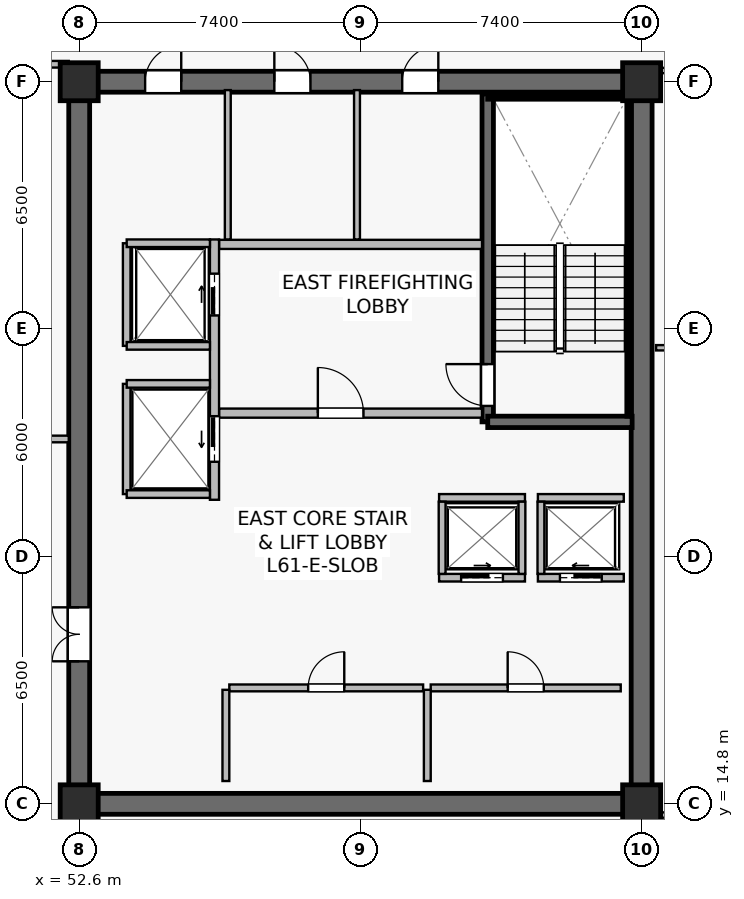
"""IFC4 building model, lengths in metres.
Left out: names, types, materials, properties, quantities, classifications, styles, units other than length and angle.
Written with IfcOpenShell. Run it as: python <this file> out.ifc"""

import sys

from ifc_helpers import new_model, si_unit, direction, frame, frame_2d, origin, origin_2d, place, context, subcontext, project, spatial, rectangle, extrude, source, transform, mapped, element, fill, save


model = new_model("IFC4")
c1 = context("Model", 3, precision=1e-05, world=origin(), true_north=direction((0.0, 1.0)))
c2 = subcontext(c1, "Body", "Model", "MODEL_VIEW")
j1 = project(units=[si_unit("LENGTHUNIT", "METRE"), si_unit("PLANEANGLEUNIT", "RADIAN")], contexts=[c1])
p1 = place(None, origin())
s1 = spatial("IfcSite", under=j1, at=p1, CompositionType="ELEMENT")
p2 = place(p1, origin())
s2 = spatial("IfcBuilding", under=s1, at=p2, CompositionType="ELEMENT")
p3 = place(p2, frame((0.0, 0.0, 254.7)))
s3 = spatial("IfcBuildingStorey", under=s2, at=p3, CompositionType="ELEMENT", Elevation=254.7)
p4 = place(p3, frame((52.325, 14.8, 0.0), z_axis=(0.0, 0.0, 1.0), x_axis=(1.0, 0.0, 0.0)))
e1 = element("IfcWall", 1, at=p4, inside=s3, PredefinedType="SHEAR", context=c2, shape_type="SweptSolid", body=[
    extrude(rectangle(XDim=15.35, YDim=0.55, at=frame_2d((7.675, 0.0))), origin(), (0.0, 0.0, 1.0), 3.8),
])
p5 = place(p3, frame((52.325, 33.8, 0.0), z_axis=(0.0, 0.0, 1.0), x_axis=(1.0, 0.0, 0.0)))
e2 = element("IfcWall", 2, at=p5, inside=s3, PredefinedType="SHEAR", context=c2, shape_type="SweptSolid", body=[
    extrude(rectangle(XDim=15.35, YDim=0.55, at=frame_2d((7.675, 0.0))), origin(), (0.0, 0.0, 1.0), 3.8),
])
p6 = place(p5, frame((8.775, 0.0, 0.0)))
e3 = element("IfcOpeningElement", 3, at=p6, cuts=e2, PredefinedType="OPENING", context=c2, shape_type="SweptSolid", body=[
    extrude(rectangle(XDim=0.95, YDim=2.15, at=frame_2d((0.475, 1.075))), frame((0.0, 0.285, 0.0), z_axis=(0.0, -1.0, 0.0), x_axis=(1.0, 0.0, 0.0)), (0.0, 0.0, 1.0), 0.57),
])
p7 = place(p5, frame((5.41, 0.0, 0.0)))
e4 = element("IfcOpeningElement", 4, at=p7, cuts=e2, PredefinedType="OPENING", context=c2, shape_type="SweptSolid", body=[
    extrude(rectangle(XDim=0.95, YDim=2.15, at=frame_2d((0.475, 1.075))), frame((0.0, 0.285, 0.0), z_axis=(0.0, -1.0, 0.0), x_axis=(1.0, 0.0, 0.0)), (0.0, 0.0, 1.0), 0.57),
])
p8 = place(p5, frame((2.01, 0.0, 0.0)))
e5 = element("IfcOpeningElement", 5, at=p8, cuts=e2, PredefinedType="OPENING", context=c2, shape_type="SweptSolid", body=[
    extrude(rectangle(XDim=0.95, YDim=2.15, at=frame_2d((0.475, 1.075))), frame((0.0, 0.285, 0.0), z_axis=(0.0, -1.0, 0.0), x_axis=(1.0, 0.0, 0.0)), (0.0, 0.0, 1.0), 0.57),
])
p9 = place(p3, frame((52.6, 15.075, 0.0), z_axis=(0.0, 0.0, 1.0), x_axis=(0.0, 1.0, 0.0)))
e6 = element("IfcWall", 6, at=p9, inside=s3, PredefinedType="SHEAR", context=c2, shape_type="SweptSolid", body=[
    extrude(rectangle(XDim=18.45, YDim=0.55, at=frame_2d((9.225, 0.0))), origin(), (0.0, 0.0, 1.0), 3.8),
])
p10 = place(p9, frame((3.475, 0.0, 0.0)))
e7 = element("IfcOpeningElement", 7, at=p10, cuts=e6, PredefinedType="OPENING", context=c2, shape_type="SweptSolid", body=[
    extrude(rectangle(XDim=1.42, YDim=2.2, at=frame_2d((0.71, 1.1))), frame((0.0, 0.285, 0.0), z_axis=(0.0, -1.0, 0.0), x_axis=(1.0, 0.0, 0.0)), (0.0, 0.0, 1.0), 0.57),
])
p11 = place(p3, frame((67.4, 15.075, 0.0), z_axis=(0.0, 0.0, 1.0), x_axis=(0.0, 1.0, 0.0)))
e8 = element("IfcWall", 8, at=p11, inside=s3, PredefinedType="SHEAR", context=c2, shape_type="SweptSolid", body=[
    extrude(rectangle(XDim=18.45, YDim=0.55, at=frame_2d((9.225, 0.0))), origin(), (0.0, 0.0, 1.0), 3.8),
])
p12 = place(p3, frame((63.35, 24.85, 0.0), z_axis=(0.0, 0.0, 1.0), x_axis=(0.0, 1.0, 0.0)))
e9 = element("IfcWall", 9, at=p12, inside=s3, PredefinedType="SHEAR", context=c2, shape_type="SweptSolid", body=[
    extrude(rectangle(XDim=8.63, YDim=0.3, at=frame_2d((4.315, 0.0))), origin(), (0.0, 0.0, 1.0), 3.8),
])
p13 = place(p12, frame((0.42, 0.0, 0.0)))
e10 = element("IfcOpeningElement", 10, at=p13, cuts=e9, PredefinedType="OPENING", context=c2, shape_type="SweptSolid", body=[
    extrude(rectangle(XDim=1.1, YDim=2.15, at=frame_2d((0.55, 1.075))), frame((0.0, 0.16, 0.0), z_axis=(0.0, -1.0, 0.0), x_axis=(1.0, 0.0, 0.0)), (0.0, 0.0, 1.0), 0.32),
])
p14 = place(p3, frame((63.35, 24.85, 0.0), z_axis=(0.0, 0.0, 1.0), x_axis=(1.0, 0.0, 0.0)))
e11 = element("IfcWall", 11, at=p14, inside=s3, PredefinedType="SHEAR", context=c2, shape_type="SweptSolid", body=[
    extrude(rectangle(XDim=3.8, YDim=0.3, at=frame_2d((1.9, 0.0))), origin(), (0.0, 0.0, 1.0), 3.8),
])
p15 = place(p3, frame((63.35, 33.4, 0.0), z_axis=(0.0, 0.0, 1.0), x_axis=(1.0, 0.0, 0.0)))
e12 = element("IfcWall", 12, at=p15, inside=s3, PredefinedType="SOLIDWALL", context=c2, shape_type="SweptSolid", body=[
    extrude(rectangle(XDim=3.72, YDim=0.12, at=frame_2d((1.86, 0.0))), origin(), (0.0, 0.0, 1.0), 3.8),
])
p16 = place(p3, frame((67.07, 25.0, 0.0), z_axis=(0.0, 0.0, 1.0), x_axis=(0.0, 1.0, 0.0)))
e13 = element("IfcWall", 13, at=p16, inside=s3, PredefinedType="SOLIDWALL", context=c2, shape_type="SweptSolid", body=[
    extrude(rectangle(XDim=8.32, YDim=0.12, at=frame_2d((4.16, 0.0))), origin(), (0.0, 0.0, 1.0), 3.8),
])
m1 = source(origin(), c2, "Body", "SweptSolid", [
    extrude(rectangle(XDim=1.0, YDim=1.0, at=origin_2d()), origin(), (0.0, 0.0, 1.0), 4.1),
])
for number, where, z_axis, x_axis in (
    (14, (52.6, 14.8, 0.0), (0.0, 0.0, 1.0), (1.0, 0.0, 0.0)),
    (15, (67.4, 14.8, 0.0), (0.0, 0.0, 1.0), (1.0, 0.0, 0.0)),
    (16, (52.6, 33.8, 0.0), (0.0, 0.0, 1.0), (1.0, 0.0, 0.0)),
    (17, (67.4, 33.8, 0.0), (0.0, 0.0, 1.0), (1.0, 0.0, 0.0)),
):
    element("IfcColumn", number, at=place(p3, frame(where, z_axis=z_axis, x_axis=x_axis)), inside=s3, PredefinedType="COLUMN", context=c2, shape_type="MappedRepresentation", body=[
        mapped(m1, transform((0.0, 0.0, 0.0), scale=1.0)),
    ])
p17 = place(p3, frame((56.28, 25.08, 0.0), z_axis=(0.0, 0.0, 1.0), x_axis=(1.0, 0.0, 0.0)))
e18 = element("IfcWall", 18, at=p17, inside=s3, PredefinedType="SOLIDWALL", context=c2, shape_type="SweptSolid", body=[
    extrude(rectangle(XDim=6.92, YDim=0.24, at=frame_2d((3.46, 0.0))), origin(), (0.0, 0.0, 1.0), 3.197),
])
p18 = place(p17, frame((2.6, 0.0, 0.0)))
e19 = element("IfcOpeningElement", 19, at=p18, cuts=e18, PredefinedType="OPENING", context=c2, shape_type="SweptSolid", body=[
    extrude(rectangle(XDim=1.2, YDim=2.16, at=frame_2d((0.6, 1.08))), frame((0.0, 0.13, 0.0), z_axis=(0.0, -1.0, 0.0), x_axis=(1.0, 0.0, 0.0)), (0.0, 0.0, 1.0), 0.26),
])
p19 = place(p3, frame((56.28, 29.52, 0.0), z_axis=(0.0, 0.0, 1.0), x_axis=(1.0, 0.0, 0.0)))
e20 = element("IfcWall", 20, at=p19, inside=s3, PredefinedType="SOLIDWALL", context=c2, shape_type="SweptSolid", body=[
    extrude(rectangle(XDim=6.92, YDim=0.24, at=frame_2d((3.46, 0.0))), origin(), (0.0, 0.0, 1.0), 3.197),
])
p20 = place(p3, frame((56.16, 22.8, 0.0), z_axis=(0.0, 0.0, 1.0), x_axis=(0.0, 1.0, 0.0)))
e21 = element("IfcWall", 21, at=p20, inside=s3, PredefinedType="SOLIDWALL", context=c2, shape_type="SweptSolid", body=[
    extrude(rectangle(XDim=6.85, YDim=0.24, at=frame_2d((3.425, 0.0))), origin(), (0.0, 0.0, 1.0), 2.935),
])
p21 = place(p20, frame((4.85, 0.0, 0.0)))
e22 = element("IfcOpeningElement", 22, at=p21, cuts=e21, PredefinedType="OPENING", context=c2, shape_type="SweptSolid", body=[
    extrude(rectangle(XDim=1.1, YDim=2.22, at=frame_2d((0.55, 1.11))), frame((0.0, 0.13, 0.0), z_axis=(0.0, -1.0, 0.0), x_axis=(1.0, 0.0, 0.0)), (0.0, 0.0, 1.0), 0.26),
])
p22 = place(p20, frame((1.0, 0.0, 0.0)))
e23 = element("IfcOpeningElement", 23, at=p22, cuts=e21, PredefinedType="OPENING", context=c2, shape_type="SweptSolid", body=[
    extrude(rectangle(XDim=1.2, YDim=2.22, at=frame_2d((0.6, 1.11))), frame((0.0, 0.13, 0.0), z_axis=(0.0, -1.0, 0.0), x_axis=(1.0, 0.0, 0.0)), (0.0, 0.0, 1.0), 0.26),
])
p23 = place(p3, frame((64.67, 20.75, 0.0), z_axis=(0.0, 0.0, 1.0), x_axis=(1.0, 0.0, 0.0)))
e24 = element("IfcWall", 24, at=p23, inside=s3, PredefinedType="SOLIDWALL", context=c2, shape_type="SweptSolid", body=[
    extrude(rectangle(XDim=2.26, YDim=0.2, at=frame_2d((1.13, 0.0))), origin(), (0.0, 0.0, 1.0), 3.8),
])
p24 = place(p23, frame((0.58, 0.0, 0.0)))
e25 = element("IfcOpeningElement", 25, at=p24, cuts=e24, PredefinedType="OPENING", context=c2, shape_type="SweptSolid", body=[
    extrude(rectangle(XDim=1.1, YDim=2.22, at=frame_2d((0.55, 1.11))), frame((0.0, 0.11, 0.0), z_axis=(0.0, -1.0, 0.0), x_axis=(1.0, 0.0, 0.0)), (0.0, 0.0, 1.0), 0.22),
])
p25 = place(p3, frame((64.67, 22.85, 0.0), z_axis=(0.0, 0.0, 1.0), x_axis=(1.0, 0.0, 0.0)))
e26 = element("IfcWall", 26, at=p25, inside=s3, PredefinedType="SOLIDWALL", context=c2, shape_type="SweptSolid", body=[
    extrude(rectangle(XDim=2.26, YDim=0.2, at=frame_2d((1.13, 0.0))), origin(), (0.0, 0.0, 1.0), 3.8),
])
p26 = place(p3, frame((64.75, 20.85, 0.0), z_axis=(0.0, 0.0, 1.0), x_axis=(0.0, 1.0, 0.0)))
e27 = element("IfcWall", 27, at=p26, inside=s3, PredefinedType="SOLIDWALL", context=c2, shape_type="SweptSolid", body=[
    extrude(rectangle(XDim=1.9, YDim=0.18, at=frame_2d((0.95, 0.0))), origin(), (0.0, 0.0, 1.0), 3.8),
])
p27 = place(p3, frame((62.07, 20.75, 0.0), z_axis=(0.0, 0.0, 1.0), x_axis=(1.0, 0.0, 0.0)))
e28 = element("IfcWall", 28, at=p27, inside=s3, PredefinedType="SOLIDWALL", context=c2, shape_type="SweptSolid", body=[
    extrude(rectangle(XDim=2.26, YDim=0.2, at=frame_2d((1.13, 0.0))), origin(), (0.0, 0.0, 1.0), 3.8),
])
p28 = place(p27, frame((0.58, 0.0, 0.0)))
e29 = element("IfcOpeningElement", 29, at=p28, cuts=e28, PredefinedType="OPENING", context=c2, shape_type="SweptSolid", body=[
    extrude(rectangle(XDim=1.1, YDim=2.22, at=frame_2d((0.55, 1.11))), frame((0.0, 0.11, 0.0), z_axis=(0.0, -1.0, 0.0), x_axis=(1.0, 0.0, 0.0)), (0.0, 0.0, 1.0), 0.22),
])
p29 = place(p3, frame((62.07, 22.85, 0.0), z_axis=(0.0, 0.0, 1.0), x_axis=(1.0, 0.0, 0.0)))
e30 = element("IfcWall", 30, at=p29, inside=s3, PredefinedType="SOLIDWALL", context=c2, shape_type="SweptSolid", body=[
    extrude(rectangle(XDim=2.26, YDim=0.2, at=frame_2d((1.13, 0.0))), origin(), (0.0, 0.0, 1.0), 3.8),
])
for number, where, z_axis, x_axis in (
    (31, (62.15, 20.85, 0.0), (0.0, 0.0, 1.0), (0.0, 1.0, 0.0)),
    (32, (64.25, 20.85, 0.0), (0.0, 0.0, 1.0), (0.0, 1.0, 0.0)),
):
    element("IfcWall", number, at=place(p3, frame(where, z_axis=z_axis, x_axis=x_axis)), inside=s3, PredefinedType="SOLIDWALL", context=c2, shape_type="SweptSolid", body=[
        extrude(rectangle(XDim=1.9, YDim=0.18, at=frame_2d((0.95, 0.0))), origin(), (0.0, 0.0, 1.0), 3.8),
    ])
p30 = place(p3, frame((53.85, 26.85, 0.0), z_axis=(0.0, 0.0, 1.0), x_axis=(0.0, 1.0, 0.0)))
e33 = element("IfcWall", 33, at=p30, inside=s3, PredefinedType="SOLIDWALL", context=c2, shape_type="SweptSolid", body=[
    extrude(rectangle(XDim=2.7, YDim=0.2, at=frame_2d((1.35, 0.0))), origin(), (0.0, 0.0, 1.0), 3.8),
])
p31 = place(p3, frame((53.85, 29.55, 0.0), z_axis=(0.0, 0.0, 1.0), x_axis=(1.0, 0.0, 0.0)))
e34 = element("IfcWall", 34, at=p31, inside=s3, PredefinedType="SOLIDWALL", context=c2, shape_type="SweptSolid", body=[
    extrude(rectangle(XDim=2.19, YDim=0.2, at=frame_2d((1.095, 0.0))), origin(), (0.0, 0.0, 1.0), 3.8),
])
p32 = place(p3, frame((53.85, 26.85, 0.0), z_axis=(0.0, 0.0, 1.0), x_axis=(1.0, 0.0, 0.0)))
e35 = element("IfcWall", 35, at=p32, inside=s3, PredefinedType="SOLIDWALL", context=c2, shape_type="SweptSolid", body=[
    extrude(rectangle(XDim=2.19, YDim=0.2, at=frame_2d((1.095, 0.0))), origin(), (0.0, 0.0, 1.0), 3.197),
])
p33 = place(p3, frame((53.85, 22.95, 0.0), z_axis=(0.0, 0.0, 1.0), x_axis=(0.0, 1.0, 0.0)))
e36 = element("IfcWall", 36, at=p33, inside=s3, PredefinedType="SOLIDWALL", context=c2, shape_type="SweptSolid", body=[
    extrude(rectangle(XDim=2.9, YDim=0.2, at=frame_2d((1.45, 0.0))), origin(), (0.0, 0.0, 1.0), 2.935),
])
for number, where, z_axis, x_axis in (
    (37, (53.85, 25.85, 0.0), (0.0, 0.0, 1.0), (1.0, 0.0, 0.0)),
    (38, (53.85, 22.95, 0.0), (0.0, 0.0, 1.0), (1.0, 0.0, 0.0)),
):
    element("IfcWall", number, at=place(p3, frame(where, z_axis=z_axis, x_axis=x_axis)), inside=s3, PredefinedType="SOLIDWALL", context=c2, shape_type="SweptSolid", body=[
        extrude(rectangle(XDim=2.19, YDim=0.2, at=frame_2d((1.095, 0.0))), origin(), (0.0, 0.0, 1.0), 3.8),
    ])
p34 = place(p3, frame((61.85, 17.85, 0.0), z_axis=(0.0, 0.0, 1.0), x_axis=(1.0, 0.0, 0.0)))
e39 = element("IfcWall", 39, at=p34, inside=s3, PredefinedType="SOLIDWALL", context=c2, shape_type="SweptSolid", body=[
    extrude(rectangle(XDim=5.0, YDim=0.18, at=frame_2d((2.5, 0.0))), origin(), (0.0, 0.0, 1.0), 3.8),
])
p35 = place(p34, frame((2.025, 0.0, 0.0)))
e40 = element("IfcOpeningElement", 40, at=p35, cuts=e39, PredefinedType="OPENING", context=c2, shape_type="SweptSolid", body=[
    extrude(rectangle(XDim=0.95, YDim=2.15, at=frame_2d((0.475, 1.075))), frame((0.0, 0.1, 0.0), z_axis=(0.0, -1.0, 0.0), x_axis=(1.0, 0.0, 0.0)), (0.0, 0.0, 1.0), 0.2),
])
p36 = place(p3, frame((61.76, 15.4, 0.0), z_axis=(0.0, 0.0, 1.0), x_axis=(0.0, 1.0, 0.0)))
e41 = element("IfcWall", 41, at=p36, inside=s3, PredefinedType="SOLIDWALL", context=c2, shape_type="SweptSolid", body=[
    extrude(rectangle(XDim=2.4, YDim=0.18, at=frame_2d((1.2, 0.0))), origin(), (0.0, 0.0, 1.0), 3.8),
])
p37 = place(p3, frame((56.55, 17.85, 0.0), z_axis=(0.0, 0.0, 1.0), x_axis=(1.0, 0.0, 0.0)))
e42 = element("IfcWall", 42, at=p37, inside=s3, PredefinedType="SOLIDWALL", context=c2, shape_type="SweptSolid", body=[
    extrude(rectangle(XDim=5.1, YDim=0.18, at=frame_2d((2.55, 0.0))), origin(), (0.0, 0.0, 1.0), 3.197),
])
p38 = place(p37, frame((2.075, 0.0, 0.0)))
e43 = element("IfcOpeningElement", 43, at=p38, cuts=e42, PredefinedType="OPENING", context=c2, shape_type="SweptSolid", body=[
    extrude(rectangle(XDim=0.95, YDim=2.15, at=frame_2d((0.475, 1.075))), frame((0.0, 0.1, 0.0), z_axis=(0.0, -1.0, 0.0), x_axis=(1.0, 0.0, 0.0)), (0.0, 0.0, 1.0), 0.2),
])
p39 = place(p3, frame((56.46, 15.4, 0.0), z_axis=(0.0, 0.0, 1.0), x_axis=(0.0, 1.0, 0.0)))
e44 = element("IfcWall", 44, at=p39, inside=s3, PredefinedType="SOLIDWALL", context=c2, shape_type="SweptSolid", body=[
    extrude(rectangle(XDim=2.4, YDim=0.18, at=frame_2d((1.2, 0.0))), origin(), (0.0, 0.0, 1.0), 3.8),
])
p40 = place(p3, frame((59.91, 29.65, 0.0), z_axis=(0.0, 0.0, 1.0), x_axis=(0.0, 1.0, 0.0)))
e45 = element("IfcWall", 45, at=p40, inside=s3, PredefinedType="PLUMBINGWALL", context=c2, shape_type="SweptSolid", body=[
    extrude(rectangle(XDim=3.93, YDim=0.155, at=frame_2d((1.965, 0.0))), origin(), (0.0, 0.0, 1.0), 3.197),
])
p41 = place(p3, frame((56.51, 29.65, 0.0), z_axis=(0.0, 0.0, 1.0), x_axis=(0.0, 1.0, 0.0)))
e46 = element("IfcWall", 46, at=p41, inside=s3, PredefinedType="PLUMBINGWALL", context=c2, shape_type="SweptSolid", body=[
    extrude(rectangle(XDim=3.93, YDim=0.155, at=frame_2d((1.965, 0.0))), origin(), (0.0, 0.0, 1.0), 3.8),
])
p42 = place(p3, frame((48.3, 34.26, 0.0), z_axis=(0.0, 0.0, 1.0), x_axis=(1.0, 0.0, 0.0)))
e47 = element("IfcWall", 47, at=p42, inside=s3, PredefinedType="PARTITIONING", context=c2, shape_type="SweptSolid", body=[
    extrude(rectangle(XDim=4.025, YDim=0.175, at=frame_2d((2.012, 0.0))), origin(), (0.0, 0.0, 1.0), 3.535),
])
p43 = place(p3, frame((48.3, 24.4, 0.0), z_axis=(0.0, 0.0, 1.0), x_axis=(1.0, 0.0, 0.0)))
e48 = element("IfcWall", 48, at=p43, inside=s3, PredefinedType="PARTITIONING", context=c2, shape_type="SweptSolid", body=[
    extrude(rectangle(XDim=4.025, YDim=0.175, at=frame_2d((2.012, 0.0))), origin(), (0.0, 0.0, 1.0), 3.8),
])
p44 = place(p43, frame((1.35, 0.0, 0.0)))
e49 = element("IfcOpeningElement", 49, at=p44, cuts=e48, PredefinedType="OPENING", context=c2, shape_type="SweptSolid", body=[
    extrude(rectangle(XDim=0.95, YDim=2.15, at=frame_2d((0.475, 1.075))), frame((0.0, 0.098, 0.0), z_axis=(0.0, -1.0, 0.0), x_axis=(1.0, 0.0, 0.0)), (0.0, 0.0, 1.0), 0.195),
])
p45 = place(p3, frame((67.78, 26.8, 0.0), z_axis=(0.0, 0.0, 1.0), x_axis=(1.0, 0.0, 0.0)))
e50 = element("IfcWall", 50, at=p45, inside=s3, PredefinedType="PARTITIONING", context=c2, shape_type="SweptSolid", body=[
    extrude(rectangle(XDim=2.91, YDim=0.14, at=frame_2d((1.455, 0.0))), origin(), (0.0, 0.0, 1.0), 3.8),
])
p46 = place(p3, frame((67.78, 14.505, 0.0), z_axis=(0.0, 0.0, 1.0), x_axis=(1.0, 0.0, 0.0)))
e51 = element("IfcWall", 51, at=p46, inside=s3, PredefinedType="PARTITIONING", context=c2, shape_type="SweptSolid", body=[
    extrude(rectangle(XDim=2.91, YDim=0.14, at=frame_2d((1.455, 0.0))), origin(), (0.0, 0.0, 1.0), 3.8),
])
p47 = place(p46, frame((1.005, 0.0, 0.0)))
e52 = element("IfcOpeningElement", 52, at=p47, cuts=e51, PredefinedType="OPENING", context=c2, shape_type="SweptSolid", body=[
    extrude(rectangle(XDim=0.9, YDim=2.1, at=frame_2d((0.45, 1.05))), frame((0.0, 0.08, 0.0), z_axis=(0.0, -1.0, 0.0), x_axis=(1.0, 0.0, 0.0)), (0.0, 0.0, 1.0), 0.16),
])
p48 = place(p3, frame((67.78, 34.095, 0.0), z_axis=(0.0, 0.0, 1.0), x_axis=(1.0, 0.0, 0.0)))
e53 = element("IfcWall", 53, at=p48, inside=s3, PredefinedType="PARTITIONING", context=c2, shape_type="SweptSolid", body=[
    extrude(rectangle(XDim=2.91, YDim=0.14, at=frame_2d((1.455, 0.0))), origin(), (0.0, 0.0, 1.0), 3.8),
])
p49 = place(p48, frame((1.005, 0.0, 0.0)))
e54 = element("IfcOpeningElement", 54, at=p49, cuts=e53, PredefinedType="OPENING", context=c2, shape_type="SweptSolid", body=[
    extrude(rectangle(XDim=0.9, YDim=2.1, at=frame_2d((0.45, 1.05))), frame((0.0, 0.08, 0.0), z_axis=(0.0, -1.0, 0.0), x_axis=(1.0, 0.0, 0.0)), (0.0, 0.0, 1.0), 0.16),
])
m2 = source(origin(), c2, "Body", "SweptSolid", [
    extrude(rectangle(XDim=1.1, YDim=2.15, at=frame_2d((0.55, 1.075))), frame((0.0, 0.025, 0.0), z_axis=(0.0, -1.0, 0.0), x_axis=(1.0, 0.0, 0.0)), (0.0, 0.0, 1.0), 0.05),
])
p50 = place(p13, origin())
e55 = element("IfcDoor", 55, at=p50, inside=s3, OperationType="SINGLE_SWING_RIGHT", PredefinedType="DOOR", context=c2, shape_type="MappedRepresentation", body=[
    mapped(m2, transform((0.0, 0.0, 0.0), scale=1.0)),
])
fill(e10, e55)
m3 = source(origin(), c2, "Body", "SweptSolid", [
    extrude(rectangle(XDim=1.2, YDim=2.16, at=frame_2d((0.6, 1.08))), frame((0.0, 0.025, 0.0), z_axis=(0.0, -1.0, 0.0), x_axis=(1.0, 0.0, 0.0)), (0.0, 0.0, 1.0), 0.05),
])
p51 = place(p18, origin())
e56 = element("IfcDoor", 56, at=p51, inside=s3, OperationType="SINGLE_SWING_LEFT", PredefinedType="DOOR", context=c2, shape_type="MappedRepresentation", body=[
    mapped(m3, transform((0.0, 0.0, 0.0), scale=1.0)),
])
fill(e19, e56)
m4 = source(origin(), c2, "Body", "SweptSolid", [
    extrude(rectangle(XDim=1.1, YDim=2.22, at=frame_2d((0.55, 1.11))), frame((0.0, 0.025, 0.0), z_axis=(0.0, -1.0, 0.0), x_axis=(1.0, 0.0, 0.0)), (0.0, 0.0, 1.0), 0.05),
])
p52 = place(p24, origin())
e57 = element("IfcDoor", 57, at=p52, inside=s3, OperationType="SLIDING_TO_LEFT", PredefinedType="USERDEFINED", context=c2, shape_type="MappedRepresentation", body=[
    mapped(m4, transform((0.0, 0.0, 0.0), scale=1.0)),
])
fill(e25, e57)
p53 = place(p28, origin())
e58 = element("IfcDoor", 58, at=p53, inside=s3, OperationType="SLIDING_TO_RIGHT", PredefinedType="USERDEFINED", context=c2, shape_type="MappedRepresentation", body=[
    mapped(m4, transform((0.0, 0.0, 0.0), scale=1.0)),
])
fill(e29, e58)
p54 = place(p21, origin())
e59 = element("IfcDoor", 59, at=p54, inside=s3, OperationType="SLIDING_TO_RIGHT", PredefinedType="USERDEFINED", context=c2, shape_type="MappedRepresentation", body=[
    mapped(m4, transform((0.0, 0.0, 0.0), scale=1.0)),
])
fill(e22, e59)
m5 = source(origin(), c2, "Body", "SweptSolid", [
    extrude(rectangle(XDim=1.2, YDim=2.22, at=frame_2d((0.6, 1.11))), frame((0.0, 0.025, 0.0), z_axis=(0.0, -1.0, 0.0), x_axis=(1.0, 0.0, 0.0)), (0.0, 0.0, 1.0), 0.05),
])
p55 = place(p22, origin())
e60 = element("IfcDoor", 60, at=p55, inside=s3, OperationType="SLIDING_TO_LEFT", PredefinedType="USERDEFINED", context=c2, shape_type="MappedRepresentation", body=[
    mapped(m5, transform((0.0, 0.0, 0.0), scale=1.0)),
])
fill(e23, e60)
m6 = source(origin(), c2, "Body", "SweptSolid", [
    extrude(rectangle(XDim=0.95, YDim=2.15, at=frame_2d((0.475, 1.075))), frame((0.0, 0.025, 0.0), z_axis=(0.0, -1.0, 0.0), x_axis=(1.0, 0.0, 0.0)), (0.0, 0.0, 1.0), 0.05),
])
p56 = place(p35, origin())
e61 = element("IfcDoor", 61, at=p56, inside=s3, OperationType="SINGLE_SWING_LEFT", PredefinedType="DOOR", context=c2, shape_type="MappedRepresentation", body=[
    mapped(m6, transform((0.0, 0.0, 0.0), scale=1.0)),
])
fill(e40, e61)
p57 = place(p38, origin())
e62 = element("IfcDoor", 62, at=p57, inside=s3, OperationType="SINGLE_SWING_RIGHT", PredefinedType="DOOR", context=c2, shape_type="MappedRepresentation", body=[
    mapped(m6, transform((0.0, 0.0, 0.0), scale=1.0)),
])
fill(e43, e62)
m7 = source(origin(), c2, "Body", "SweptSolid", [
    extrude(rectangle(XDim=1.42, YDim=2.2, at=frame_2d((0.71, 1.1))), frame((0.0, 0.025, 0.0), z_axis=(0.0, -1.0, 0.0), x_axis=(1.0, 0.0, 0.0)), (0.0, 0.0, 1.0), 0.05),
])
p58 = place(p10, origin())
e63 = element("IfcDoor", 63, at=p58, inside=s3, OperationType="DOUBLE_DOOR_SINGLE_SWING", PredefinedType="DOOR", context=c2, shape_type="MappedRepresentation", body=[
    mapped(m7, transform((0.0, 0.0, 0.0), scale=1.0)),
])
fill(e7, e63)
p59 = place(p6, origin())
e64 = element("IfcDoor", 64, at=p59, inside=s3, OperationType="SINGLE_SWING_RIGHT", PredefinedType="DOOR", context=c2, shape_type="MappedRepresentation", body=[
    mapped(m6, transform((0.0, 0.0, 0.0), scale=1.0)),
])
fill(e3, e64)
p60 = place(p7, origin())
e65 = element("IfcDoor", 65, at=p60, inside=s3, OperationType="SINGLE_SWING_LEFT", PredefinedType="DOOR", context=c2, shape_type="MappedRepresentation", body=[
    mapped(m6, transform((0.0, 0.0, 0.0), scale=1.0)),
])
fill(e4, e65)
p61 = place(p8, origin())
e66 = element("IfcDoor", 66, at=p61, inside=s3, OperationType="SINGLE_SWING_RIGHT", PredefinedType="DOOR", context=c2, shape_type="MappedRepresentation", body=[
    mapped(m6, transform((0.0, 0.0, 0.0), scale=1.0)),
])
fill(e5, e66)
save(model, sys.argv[1])
